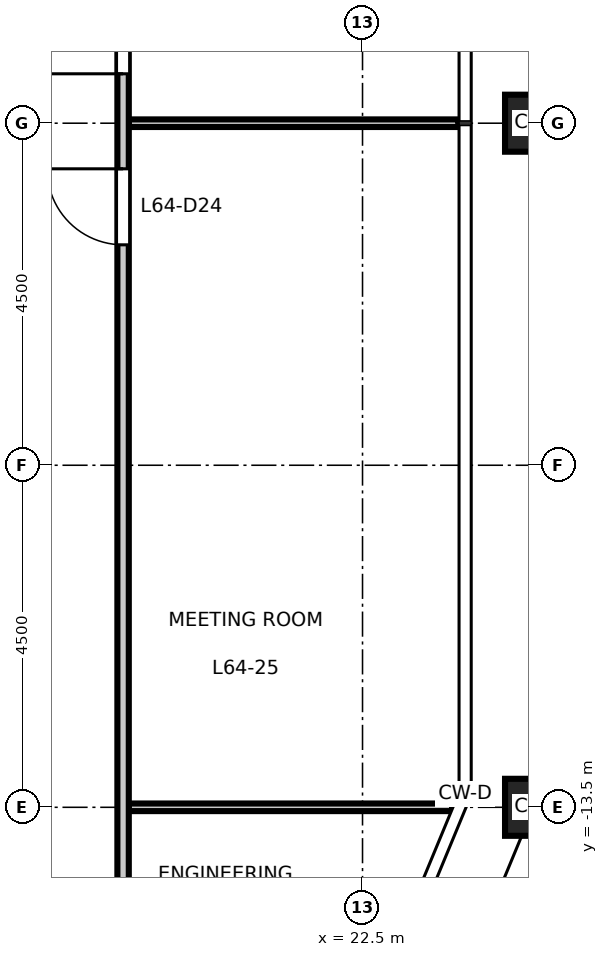
"""IFC4 building model, lengths in metres.
Left out: names, types, materials, properties, quantities, classifications, styles, units other than length and angle.
Written with IfcOpenShell. Run it as: python <this file> out.ifc"""

import sys

from ifc_helpers import new_model, si_unit, direction, frame, frame_2d, origin, origin_2d, place, context, subcontext, project, spatial, rectangle, hollow_rectangle, extrude, element, fill, save


model = new_model("IFC4")
c1 = context("Model", 3, precision=1e-05, world=origin(), true_north=direction((0.0, 1.0)))
c2 = subcontext(c1, "Body", "Model", "MODEL_VIEW")
j1 = project(units=[si_unit("LENGTHUNIT", "METRE"), si_unit("PLANEANGLEUNIT", "RADIAN")], contexts=[c1])
p1 = place(None, origin())
s1 = spatial("IfcSite", under=j1, at=p1, CompositionType="ELEMENT")
p2 = place(p1, origin())
s2 = spatial("IfcBuilding", under=s1, at=p2, CompositionType="ELEMENT")
p3 = place(p2, frame((0.0, 0.0, 298.7)))
s3 = spatial("IfcBuildingStorey", under=s2, at=p3, CompositionType="ELEMENT", Elevation=298.7)
for number, where, z_axis, x_axis in (
    (1, (24.75, -13.5, 0.0), (0.0, 0.0, 1.0), (1.0, 0.0, 0.0)),
    (2, (24.75, -4.5, 0.0), (0.0, 0.0, 1.0), (1.0, 0.0, 0.0)),
):
    element("IfcColumn", number, at=place(p3, frame(where, z_axis=z_axis, x_axis=x_axis)), inside=s3, PredefinedType="COLUMN", context=c2, shape_type="SweptSolid", body=[
        extrude(hollow_rectangle(XDim=0.75, YDim=0.75, WallThickness=0.04, at=origin_2d()), origin(), (0.0, 0.0, 1.0), 4.5),
    ])
p4 = place(p3, frame((19.425, -13.5, 0.0), z_axis=(0.0, 0.0, 1.0), x_axis=(1.0, 0.0, 0.0)))
e3 = element("IfcWall", 3, at=p4, inside=s3, PredefinedType="PARTITIONING", context=c2, shape_type="SweptSolid", body=[
    extrude(rectangle(XDim=4.253, YDim=0.1, at=frame_2d((2.126, 0.0))), origin(), (0.0, 0.0, 1.0), 4.35),
])
p5 = place(p3, frame((19.425, -4.5, 0.0), z_axis=(0.0, 0.0, 1.0), x_axis=(1.0, 0.0, 0.0)))
e4 = element("IfcWall", 4, at=p5, inside=s3, PredefinedType="PARTITIONING", context=c2, shape_type="SweptSolid", body=[
    extrude(rectangle(XDim=4.335, YDim=0.1, at=frame_2d((2.167, 0.0))), origin(), (0.0, 0.0, 1.0), 4.35),
])
p6 = place(p3, frame((19.35, -16.42, 0.0), z_axis=(0.0, 0.0, 1.0), x_axis=(0.0, 1.0, 0.0)))
e5 = element("IfcWall", 5, at=p6, inside=s3, PredefinedType="PARTITIONING", context=c2, shape_type="SweptSolid", body=[
    extrude(rectangle(XDim=32.845, YDim=0.15, at=frame_2d((16.422, 0.0))), origin(), (0.0, 0.0, 1.0), 4.35),
])
p7 = place(p6, frame((10.32, 0.0, 0.0)))
e6 = element("IfcOpeningElement", 6, at=p7, cuts=e5, PredefinedType="OPENING", context=c2, shape_type="SweptSolid", body=[
    extrude(rectangle(XDim=1.0, YDim=2.1, at=frame_2d((0.5, 1.05))), frame((0.0, 0.085, 0.0), z_axis=(0.0, -1.0, 0.0), x_axis=(1.0, 0.0, 0.0)), (0.0, 0.0, 1.0), 0.17),
])
p8 = place(p6, frame((12.57, 0.0, 0.0)))
e7 = element("IfcOpeningElement", 7, at=p8, cuts=e5, PredefinedType="OPENING", context=c2, shape_type="SweptSolid", body=[
    extrude(rectangle(XDim=1.0, YDim=2.1, at=frame_2d((0.5, 1.05))), frame((0.0, 0.085, 0.0), z_axis=(0.0, -1.0, 0.0), x_axis=(1.0, 0.0, 0.0)), (0.0, 0.0, 1.0), 0.17),
])
p9 = place(p6, frame((28.32, 0.0, 0.0)))
e8 = element("IfcOpeningElement", 8, at=p9, cuts=e5, PredefinedType="OPENING", context=c2, shape_type="SweptSolid", body=[
    extrude(rectangle(XDim=1.0, YDim=2.1, at=frame_2d((0.5, 1.05))), frame((0.0, 0.085, 0.0), z_axis=(0.0, -1.0, 0.0), x_axis=(1.0, 0.0, 0.0)), (0.0, 0.0, 1.0), 0.17),
])
p10 = place(p7, origin())
e9 = element("IfcDoor", 9, at=p10, inside=s3, OperationType="SINGLE_SWING_RIGHT", PredefinedType="DOOR", context=c2, shape_type="SweptSolid", body=[
    extrude(rectangle(XDim=1.0, YDim=2.1, at=frame_2d((0.5, 1.05))), frame((0.0, 0.025, 0.0), z_axis=(0.0, -1.0, 0.0), x_axis=(1.0, 0.0, 0.0)), (0.0, 0.0, 1.0), 0.05),
])
fill(e6, e9)
p11 = place(p8, origin())
e10 = element("IfcDoor", 10, at=p11, inside=s3, OperationType="SINGLE_SWING_LEFT", PredefinedType="DOOR", context=c2, shape_type="SweptSolid", body=[
    extrude(rectangle(XDim=1.0, YDim=2.1, at=frame_2d((0.5, 1.05))), frame((0.0, 0.025, 0.0), z_axis=(0.0, -1.0, 0.0), x_axis=(1.0, 0.0, 0.0)), (0.0, 0.0, 1.0), 0.05),
])
fill(e7, e10)
save(model, sys.argv[1])
